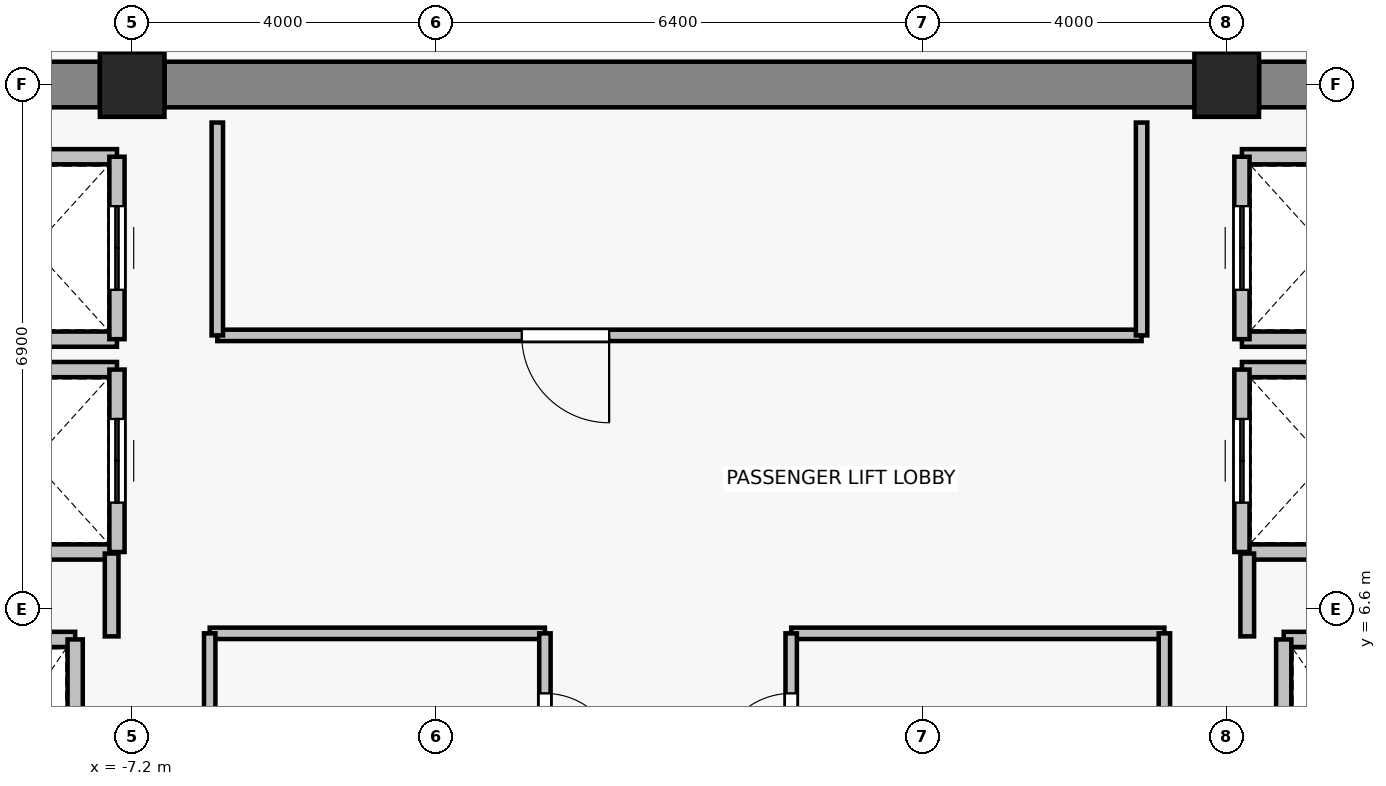
"""IFC4 building model, lengths in metres.
Left out: names, types, materials, properties, quantities, classifications, styles, units other than length and angle.
Written with IfcOpenShell. Run it as: python <this file> out.ifc"""

import sys

from ifc_helpers import new_model, si_unit, direction, frame, frame_2d, origin, origin_2d, place, context, subcontext, project, spatial, rectangle, extrude, source, transform, mapped, element, fill, save


model = new_model("IFC4")
c1 = context("Model", 3, precision=1e-05, world=origin(), true_north=direction((0.0, 1.0)))
c2 = subcontext(c1, "Body", "Model", "MODEL_VIEW")
j1 = project(units=[si_unit("LENGTHUNIT", "METRE"), si_unit("PLANEANGLEUNIT", "RADIAN")], contexts=[c1])
p1 = place(None, origin())
s1 = spatial("IfcSite", under=j1, at=p1, CompositionType="ELEMENT")
p2 = place(p1, origin())
s2 = spatial("IfcBuilding", under=s1, at=p2, CompositionType="ELEMENT")
p3 = place(p2, frame((0.0, 0.0, 265.0)))
s3 = spatial("IfcBuildingStorey", under=s2, at=p3, CompositionType="ELEMENT", Elevation=265.0)
for number, where, z_axis, x_axis in (
    (1, (-7.2, 13.5, 0.0), (0.0, 0.0, 1.0), (1.0, 0.0, 0.0)),
    (2, (7.2, 13.5, 0.0), (0.0, 0.0, 1.0), (1.0, 0.0, 0.0)),
):
    element("IfcColumn", number, at=place(p3, frame(where, z_axis=z_axis, x_axis=x_axis)), inside=s3, PredefinedType="COLUMN", context=c2, shape_type="SweptSolid", body=[
        extrude(rectangle(XDim=0.85, YDim=0.85, at=origin_2d()), origin(), (0.0, 0.0, 1.0), 3.3),
    ])
p4 = place(p3, frame((-13.975, 13.5, 0.0), z_axis=(0.0, 0.0, 1.0), x_axis=(1.0, 0.0, 0.0)))
e3 = element("IfcWall", 3, at=p4, inside=s3, PredefinedType="SHEAR", context=c2, shape_type="SweptSolid", body=[
    extrude(rectangle(XDim=6.35, YDim=0.6, at=frame_2d((3.175, 0.0))), origin(), (0.0, 0.0, 1.0), 3.075),
])
p5 = place(p3, frame((-6.775, 13.5, 0.0), z_axis=(0.0, 0.0, 1.0), x_axis=(1.0, 0.0, 0.0)))
e4 = element("IfcWall", 4, at=p5, inside=s3, PredefinedType="SHEAR", context=c2, shape_type="SweptSolid", body=[
    extrude(rectangle(XDim=13.55, YDim=0.6, at=frame_2d((6.775, 0.0))), origin(), (0.0, 0.0, 1.0), 3.075),
])
p6 = place(p3, frame((7.625, 13.5, 0.0), z_axis=(0.0, 0.0, 1.0), x_axis=(1.0, 0.0, 0.0)))
e5 = element("IfcWall", 5, at=p6, inside=s3, PredefinedType="SHEAR", context=c2, shape_type="SweptSolid", body=[
    extrude(rectangle(XDim=6.35, YDim=0.6, at=frame_2d((3.175, 0.0))), origin(), (0.0, 0.0, 1.0), 3.075),
])
p7 = place(p3, frame((-9.95, 6.2, 0.0), z_axis=(0.0, 0.0, 1.0), x_axis=(1.0, 0.0, 0.0)))
e6 = element("IfcWall", 6, at=p7, inside=s3, PredefinedType="SOLIDWALL", context=c2, shape_type="SweptSolid", body=[
    extrude(rectangle(XDim=2.0, YDim=0.2, at=frame_2d((1.0, 0.0))), origin(), (0.0, 0.0, 1.0), 3.075),
])
p8 = place(p3, frame((-7.95, 6.2, 0.0), z_axis=(0.0, 0.0, 1.0), x_axis=(0.0, -1.0, 0.0)))
e7 = element("IfcWall", 7, at=p8, inside=s3, PredefinedType="SOLIDWALL", context=c2, shape_type="SweptSolid", body=[
    extrude(rectangle(XDim=2.8, YDim=0.2, at=frame_2d((1.4, 0.0))), origin(), (0.0, 0.0, 1.0), 3.075),
])
p9 = place(p3, frame((7.95, 6.2, 0.0), z_axis=(0.0, 0.0, 1.0), x_axis=(1.0, 0.0, 0.0)))
e8 = element("IfcWall", 8, at=p9, inside=s3, PredefinedType="SOLIDWALL", context=c2, shape_type="SweptSolid", body=[
    extrude(rectangle(XDim=2.0, YDim=0.2, at=frame_2d((1.0, 0.0))), origin(), (0.0, 0.0, 1.0), 3.075),
])
p10 = place(p3, frame((7.95, 3.4, 0.0), z_axis=(0.0, 0.0, 1.0), x_axis=(0.0, 1.0, 0.0)))
e9 = element("IfcWall", 9, at=p10, inside=s3, PredefinedType="SOLIDWALL", context=c2, shape_type="SweptSolid", body=[
    extrude(rectangle(XDim=2.8, YDim=0.2, at=frame_2d((1.4, 0.0))), origin(), (0.0, 0.0, 1.0), 3.075),
])
for number, where, z_axis, x_axis in (
    (10, (-7.4, 7.35, 0.0), (0.0, 0.0, 1.0), (-1.0, 0.0, 0.0)),
    (11, (-9.6, 9.75, 0.0), (0.0, 0.0, 1.0), (1.0, 0.0, 0.0)),
):
    element("IfcWall", number, at=place(p3, frame(where, z_axis=z_axis, x_axis=x_axis)), inside=s3, PredefinedType="SOLIDWALL", context=c2, shape_type="SweptSolid", body=[
        extrude(rectangle(XDim=2.2, YDim=0.2, at=frame_2d((1.1, 0.0))), origin(), (0.0, 0.0, 1.0), 2.615),
    ])
p11 = place(p3, frame((-7.4, 9.75, 0.0), z_axis=(0.0, 0.0, 1.0), x_axis=(0.0, -1.0, 0.0)))
e12 = element("IfcWall", 12, at=p11, inside=s3, PredefinedType="SOLIDWALL", context=c2, shape_type="SweptSolid", body=[
    extrude(rectangle(XDim=2.4, YDim=0.2, at=frame_2d((1.2, 0.0))), origin(), (0.0, 0.0, 1.0), 2.615),
])
p12 = place(p11, frame((0.65, 0.0, 0.0)))
e13 = element("IfcOpeningElement", 13, at=p12, cuts=e12, PredefinedType="OPENING", context=c2, shape_type="SweptSolid", body=[
    extrude(rectangle(XDim=1.1, YDim=2.2, at=frame_2d((0.55, 1.1))), frame((0.0, 0.11, 0.0), z_axis=(0.0, -1.0, 0.0), x_axis=(1.0, 0.0, 0.0)), (0.0, 0.0, 1.0), 0.22),
])
for number, where, z_axis, x_axis in (
    (14, (-7.4, 10.15, 0.0), (0.0, 0.0, 1.0), (-1.0, 0.0, 0.0)),
    (15, (-9.6, 12.55, 0.0), (0.0, 0.0, 1.0), (1.0, 0.0, 0.0)),
):
    element("IfcWall", number, at=place(p3, frame(where, z_axis=z_axis, x_axis=x_axis)), inside=s3, PredefinedType="SOLIDWALL", context=c2, shape_type="SweptSolid", body=[
        extrude(rectangle(XDim=2.2, YDim=0.2, at=frame_2d((1.1, 0.0))), origin(), (0.0, 0.0, 1.0), 2.615),
    ])
p13 = place(p3, frame((-7.4, 12.55, 0.0), z_axis=(0.0, 0.0, 1.0), x_axis=(0.0, -1.0, 0.0)))
e16 = element("IfcWall", 16, at=p13, inside=s3, PredefinedType="SOLIDWALL", context=c2, shape_type="SweptSolid", body=[
    extrude(rectangle(XDim=2.4, YDim=0.2, at=frame_2d((1.2, 0.0))), origin(), (0.0, 0.0, 1.0), 2.615),
])
p14 = place(p13, frame((0.65, 0.0, 0.0)))
e17 = element("IfcOpeningElement", 17, at=p14, cuts=e16, PredefinedType="OPENING", context=c2, shape_type="SweptSolid", body=[
    extrude(rectangle(XDim=1.1, YDim=2.2, at=frame_2d((0.55, 1.1))), frame((0.0, 0.11, 0.0), z_axis=(0.0, -1.0, 0.0), x_axis=(1.0, 0.0, 0.0)), (0.0, 0.0, 1.0), 0.22),
])
for number, where, z_axis, x_axis in (
    (18, (9.6, 7.35, 0.0), (0.0, 0.0, 1.0), (-1.0, 0.0, 0.0)),
    (19, (7.4, 9.75, 0.0), (0.0, 0.0, 1.0), (1.0, 0.0, 0.0)),
):
    element("IfcWall", number, at=place(p3, frame(where, z_axis=z_axis, x_axis=x_axis)), inside=s3, PredefinedType="SOLIDWALL", context=c2, shape_type="SweptSolid", body=[
        extrude(rectangle(XDim=2.2, YDim=0.2, at=frame_2d((1.1, 0.0))), origin(), (0.0, 0.0, 1.0), 2.615),
    ])
p15 = place(p3, frame((7.4, 7.35, 0.0), z_axis=(0.0, 0.0, 1.0), x_axis=(0.0, 1.0, 0.0)))
e20 = element("IfcWall", 20, at=p15, inside=s3, PredefinedType="SOLIDWALL", context=c2, shape_type="SweptSolid", body=[
    extrude(rectangle(XDim=2.4, YDim=0.2, at=frame_2d((1.2, 0.0))), origin(), (0.0, 0.0, 1.0), 2.615),
])
p16 = place(p15, frame((0.65, 0.0, 0.0)))
e21 = element("IfcOpeningElement", 21, at=p16, cuts=e20, PredefinedType="OPENING", context=c2, shape_type="SweptSolid", body=[
    extrude(rectangle(XDim=1.1, YDim=2.2, at=frame_2d((0.55, 1.1))), frame((0.0, 0.11, 0.0), z_axis=(0.0, -1.0, 0.0), x_axis=(1.0, 0.0, 0.0)), (0.0, 0.0, 1.0), 0.22),
])
for number, where, z_axis, x_axis in (
    (22, (9.6, 10.15, 0.0), (0.0, 0.0, 1.0), (-1.0, 0.0, 0.0)),
    (23, (7.4, 12.55, 0.0), (0.0, 0.0, 1.0), (1.0, 0.0, 0.0)),
):
    element("IfcWall", number, at=place(p3, frame(where, z_axis=z_axis, x_axis=x_axis)), inside=s3, PredefinedType="SOLIDWALL", context=c2, shape_type="SweptSolid", body=[
        extrude(rectangle(XDim=2.2, YDim=0.2, at=frame_2d((1.1, 0.0))), origin(), (0.0, 0.0, 1.0), 2.615),
    ])
p17 = place(p3, frame((7.4, 10.15, 0.0), z_axis=(0.0, 0.0, 1.0), x_axis=(0.0, 1.0, 0.0)))
e24 = element("IfcWall", 24, at=p17, inside=s3, PredefinedType="SOLIDWALL", context=c2, shape_type="SweptSolid", body=[
    extrude(rectangle(XDim=2.4, YDim=0.2, at=frame_2d((1.2, 0.0))), origin(), (0.0, 0.0, 1.0), 2.615),
])
p18 = place(p17, frame((0.65, 0.0, 0.0)))
e25 = element("IfcOpeningElement", 25, at=p18, cuts=e24, PredefinedType="OPENING", context=c2, shape_type="SweptSolid", body=[
    extrude(rectangle(XDim=1.1, YDim=2.2, at=frame_2d((0.55, 1.1))), frame((0.0, 0.11, 0.0), z_axis=(0.0, -1.0, 0.0), x_axis=(1.0, 0.0, 0.0)), (0.0, 0.0, 1.0), 0.22),
])
for number, where, z_axis, x_axis in (
    (26, (-7.47, 7.33, 0.0), (0.0, 0.0, 1.0), (0.0, -1.0, 0.0)),
    (27, (7.47, 6.24, 0.0), (0.0, 0.0, 1.0), (0.0, 1.0, 0.0)),
):
    element("IfcWall", number, at=place(p3, frame(where, z_axis=z_axis, x_axis=x_axis)), inside=s3, PredefinedType="PARTITIONING", context=c2, shape_type="SweptSolid", body=[
        extrude(rectangle(XDim=1.09, YDim=0.18, at=frame_2d((0.545, 0.0))), origin(), (0.0, 0.0, 1.0), 2.615),
    ])
p19 = place(p3, frame((6.08, 10.2, 0.0), z_axis=(0.0, 0.0, 1.0), x_axis=(-1.0, 0.0, 0.0)))
e28 = element("IfcWall", 28, at=p19, inside=s3, PredefinedType="PARTITIONING", context=c2, shape_type="SweptSolid", body=[
    extrude(rectangle(XDim=12.16, YDim=0.15, at=frame_2d((6.08, 0.0))), origin(), (0.0, 0.0, 1.0), 3.075),
])
p20 = place(p19, frame((7.005, 0.0, 0.0)))
e29 = element("IfcOpeningElement", 29, at=p20, cuts=e28, PredefinedType="OPENING", context=c2, shape_type="SweptSolid", body=[
    extrude(rectangle(XDim=1.15, YDim=2.15, at=frame_2d((0.575, 1.075))), frame((0.0, 0.085, 0.0), z_axis=(0.0, -1.0, 0.0), x_axis=(1.0, 0.0, 0.0)), (0.0, 0.0, 1.0), 0.17),
])
for number, where, z_axis, x_axis in (
    (30, (-6.08, 10.2, 0.0), (0.0, 0.0, 1.0), (0.0, 1.0, 0.0)),
    (31, (6.08, 13.0, 0.0), (0.0, 0.0, 1.0), (0.0, -1.0, 0.0)),
):
    element("IfcWall", number, at=place(p3, frame(where, z_axis=z_axis, x_axis=x_axis)), inside=s3, PredefinedType="PARTITIONING", context=c2, shape_type="SweptSolid", body=[
        extrude(rectangle(XDim=2.8, YDim=0.15, at=frame_2d((1.4, 0.0))), origin(), (0.0, 0.0, 1.0), 3.075),
    ])
p21 = place(p3, frame((-6.18, 6.28, 0.0), z_axis=(0.0, 0.0, 1.0), x_axis=(1.0, 0.0, 0.0)))
e32 = element("IfcWall", 32, at=p21, inside=s3, PredefinedType="PARTITIONING", context=c2, shape_type="SweptSolid", body=[
    extrude(rectangle(XDim=4.41, YDim=0.15, at=frame_2d((2.205, 0.0))), origin(), (0.0, 0.0, 1.0), 3.075),
])
p22 = place(p3, frame((-6.18, 3.76, 0.0), z_axis=(0.0, 0.0, 1.0), x_axis=(0.0, 1.0, 0.0)))
e33 = element("IfcWall", 33, at=p22, inside=s3, PredefinedType="PARTITIONING", context=c2, shape_type="SweptSolid", body=[
    extrude(rectangle(XDim=2.52, YDim=0.15, at=frame_2d((1.26, 0.0))), origin(), (0.0, 0.0, 1.0), 3.075),
])
p23 = place(p3, frame((-1.77, 6.28, 0.0), z_axis=(0.0, 0.0, 1.0), x_axis=(0.0, -1.0, 0.0)))
e34 = element("IfcWall", 34, at=p23, inside=s3, PredefinedType="PARTITIONING", context=c2, shape_type="SweptSolid", body=[
    extrude(rectangle(XDim=2.52, YDim=0.15, at=frame_2d((1.26, 0.0))), origin(), (0.0, 0.0, 1.0), 3.075),
])
p24 = place(p23, frame((0.79, 0.0, 0.0)))
e35 = element("IfcOpeningElement", 35, at=p24, cuts=e34, PredefinedType="OPENING", context=c2, shape_type="SweptSolid", body=[
    extrude(rectangle(XDim=0.98, YDim=2.15, at=frame_2d((0.49, 1.075))), frame((0.0, 0.085, 0.0), z_axis=(0.0, -1.0, 0.0), x_axis=(1.0, 0.0, 0.0)), (0.0, 0.0, 1.0), 0.17),
])
p25 = place(p3, frame((1.47, 6.28, 0.0), z_axis=(0.0, 0.0, 1.0), x_axis=(1.0, 0.0, 0.0)))
e36 = element("IfcWall", 36, at=p25, inside=s3, PredefinedType="PARTITIONING", context=c2, shape_type="SweptSolid", body=[
    extrude(rectangle(XDim=4.91, YDim=0.15, at=frame_2d((2.455, 0.0))), origin(), (0.0, 0.0, 1.0), 3.075),
])
p26 = place(p3, frame((1.47, 3.76, 0.0), z_axis=(0.0, 0.0, 1.0), x_axis=(0.0, 1.0, 0.0)))
e37 = element("IfcWall", 37, at=p26, inside=s3, PredefinedType="PARTITIONING", context=c2, shape_type="SweptSolid", body=[
    extrude(rectangle(XDim=2.52, YDim=0.15, at=frame_2d((1.26, 0.0))), origin(), (0.0, 0.0, 1.0), 3.075),
])
p27 = place(p26, frame((0.75, 0.0, 0.0)))
e38 = element("IfcOpeningElement", 38, at=p27, cuts=e37, PredefinedType="OPENING", context=c2, shape_type="SweptSolid", body=[
    extrude(rectangle(XDim=0.98, YDim=2.15, at=frame_2d((0.49, 1.075))), frame((0.0, 0.085, 0.0), z_axis=(0.0, -1.0, 0.0), x_axis=(1.0, 0.0, 0.0)), (0.0, 0.0, 1.0), 0.17),
])
p28 = place(p3, frame((6.38, 6.28, 0.0), z_axis=(0.0, 0.0, 1.0), x_axis=(0.0, -1.0, 0.0)))
e39 = element("IfcWall", 39, at=p28, inside=s3, PredefinedType="PARTITIONING", context=c2, shape_type="SweptSolid", body=[
    extrude(rectangle(XDim=2.52, YDim=0.15, at=frame_2d((1.26, 0.0))), origin(), (0.0, 0.0, 1.0), 3.075),
])
m1 = source(origin(), c2, "Body", "SweptSolid", [
    extrude(rectangle(XDim=1.1, YDim=2.2, at=frame_2d((0.55, 1.1))), frame((0.0, 0.025, 0.0), z_axis=(0.0, -1.0, 0.0), x_axis=(1.0, 0.0, 0.0)), (0.0, 0.0, 1.0), 0.05),
])
p29 = place(p12, origin())
e40 = element("IfcDoor", 40, at=p29, inside=s3, OperationType="DOUBLE_DOOR_SLIDING", PredefinedType="DOOR", context=c2, shape_type="MappedRepresentation", body=[
    mapped(m1, transform((0.0, 0.0, 0.0), x_axis=(1.0, 0.0, 0.0), y_axis=(0.0, 1.0, 0.0), z_axis=(0.0, 0.0, 1.0), scale=1.0)),
])
fill(e13, e40)
p30 = place(p14, origin())
e41 = element("IfcDoor", 41, at=p30, inside=s3, OperationType="DOUBLE_DOOR_SLIDING", PredefinedType="DOOR", context=c2, shape_type="MappedRepresentation", body=[
    mapped(m1, transform((0.0, 0.0, 0.0), x_axis=(1.0, 0.0, 0.0), y_axis=(0.0, 1.0, 0.0), z_axis=(0.0, 0.0, 1.0), scale=1.0)),
])
fill(e17, e41)
p31 = place(p16, origin())
e42 = element("IfcDoor", 42, at=p31, inside=s3, OperationType="DOUBLE_DOOR_SLIDING", PredefinedType="DOOR", context=c2, shape_type="MappedRepresentation", body=[
    mapped(m1, transform((0.0, 0.0, 0.0), x_axis=(1.0, 0.0, 0.0), y_axis=(0.0, 1.0, 0.0), z_axis=(0.0, 0.0, 1.0), scale=1.0)),
])
fill(e21, e42)
p32 = place(p18, origin())
e43 = element("IfcDoor", 43, at=p32, inside=s3, OperationType="DOUBLE_DOOR_SLIDING", PredefinedType="DOOR", context=c2, shape_type="MappedRepresentation", body=[
    mapped(m1, transform((0.0, 0.0, 0.0), x_axis=(1.0, 0.0, 0.0), y_axis=(0.0, 1.0, 0.0), z_axis=(0.0, 0.0, 1.0), scale=1.0)),
])
fill(e25, e43)
m2 = source(origin(), c2, "Body", "SweptSolid", [
    extrude(rectangle(XDim=1.15, YDim=2.15, at=frame_2d((0.575, 1.075))), frame((0.0, 0.025, 0.0), z_axis=(0.0, -1.0, 0.0), x_axis=(1.0, 0.0, 0.0)), (0.0, 0.0, 1.0), 0.05),
])
p33 = place(p20, origin())
e44 = element("IfcDoor", 44, at=p33, inside=s3, OperationType="SINGLE_SWING_LEFT", PredefinedType="DOOR", context=c2, shape_type="MappedRepresentation", body=[
    mapped(m2, transform((0.0, 0.0, 0.0), x_axis=(1.0, 0.0, 0.0), y_axis=(0.0, 1.0, 0.0), z_axis=(0.0, 0.0, 1.0), scale=1.0)),
])
fill(e29, e44)
m3 = source(origin(), c2, "Body", "SweptSolid", [
    extrude(rectangle(XDim=0.98, YDim=2.15, at=frame_2d((0.49, 1.075))), frame((0.0, 0.025, 0.0), z_axis=(0.0, -1.0, 0.0), x_axis=(1.0, 0.0, 0.0)), (0.0, 0.0, 1.0), 0.05),
])
p34 = place(p24, origin())
e45 = element("IfcDoor", 45, at=p34, inside=s3, OperationType="SINGLE_SWING_RIGHT", PredefinedType="DOOR", context=c2, shape_type="MappedRepresentation", body=[
    mapped(m3, transform((0.0, 0.0, 0.0), x_axis=(1.0, 0.0, 0.0), y_axis=(0.0, 1.0, 0.0), z_axis=(0.0, 0.0, 1.0), scale=1.0)),
])
fill(e35, e45)
p35 = place(p27, origin())
e46 = element("IfcDoor", 46, at=p35, inside=s3, OperationType="SINGLE_SWING_LEFT", PredefinedType="DOOR", context=c2, shape_type="MappedRepresentation", body=[
    mapped(m3, transform((0.0, 0.0, 0.0), x_axis=(1.0, 0.0, 0.0), y_axis=(0.0, 1.0, 0.0), z_axis=(0.0, 0.0, 1.0), scale=1.0)),
])
fill(e38, e46)
save(model, sys.argv[1])
